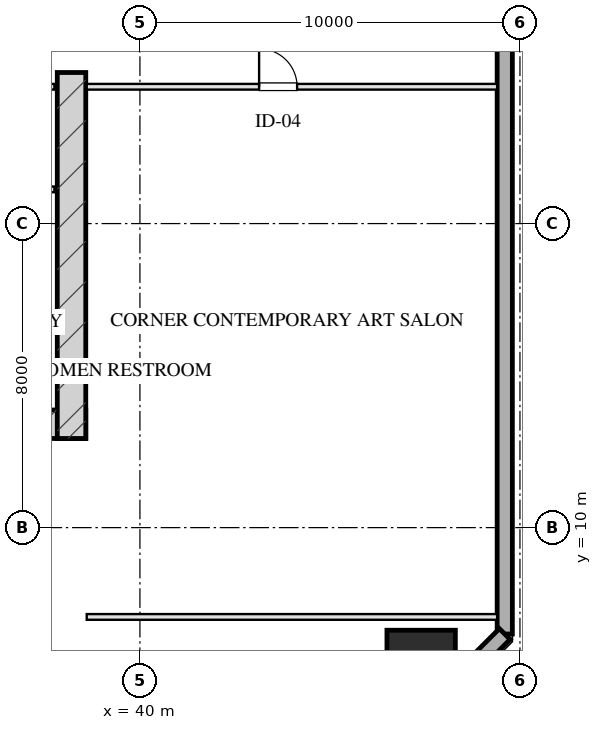
"""IFC4 building model, lengths in metres.
Left out: names, types, materials, properties, quantities, classifications, styles, units other than length and angle.
Written with IfcOpenShell. Run it as: python <this file> out.ifc"""

import sys

from ifc_helpers import new_model, si_unit, direction, frame, frame_2d, origin, origin_2d, place, context, subcontext, project, spatial, rectangle, hollow_rectangle, extrude, element, fill, save


model = new_model("IFC4")
c1 = context("Model", 3, precision=1e-05, world=origin(), true_north=direction((0.0, 1.0)))
c2 = subcontext(c1, "Body", "Model", "MODEL_VIEW")
j1 = project(units=[si_unit("LENGTHUNIT", "METRE"), si_unit("PLANEANGLEUNIT", "RADIAN")], contexts=[c1])
p1 = place(None, origin())
s1 = spatial("IfcSite", under=j1, at=p1, CompositionType="ELEMENT")
p2 = place(p1, origin())
s2 = spatial("IfcBuilding", under=s1, at=p2, CompositionType="ELEMENT")
p3 = place(p2, frame((0.0, 0.0, 54.05)))
s3 = spatial("IfcBuildingStorey", under=s2, at=p3, CompositionType="ELEMENT", Elevation=54.05)
p4 = place(p3, frame((21.425, 12.72, 0.0), z_axis=(0.0, 0.0, 1.0), x_axis=(1.0, 0.0, 0.0)))
e1 = element("IfcWall", 1, at=p4, inside=s3, PredefinedType="SHEAR", context=c2, shape_type="SweptSolid", body=[
    extrude(rectangle(XDim=17.15, YDim=0.75, at=frame_2d((8.575, 0.0))), origin(), (0.0, 0.0, 1.0), 3.45),
])
p5 = place(p3, frame((38.2, 21.975, 0.0), z_axis=(0.0, 0.0, 1.0), x_axis=(0.0, -1.0, 0.0)))
e2 = element("IfcWall", 2, at=p5, inside=s3, PredefinedType="SHEAR", context=c2, shape_type="SweptSolid", body=[
    extrude(rectangle(XDim=9.63, YDim=0.75, at=frame_2d((4.815, 0.0))), origin(), (0.0, 0.0, 1.0), 3.45),
])
p6 = place(p3, frame((47.4, 6.4, 0.0), z_axis=(0.0, 0.0, 1.0), x_axis=(1.0, 0.0, 0.0)))
e3 = element("IfcColumn", 3, at=p6, inside=s3, PredefinedType="COLUMN", context=c2, shape_type="SweptSolid", body=[
    extrude(hollow_rectangle(XDim=1.8, YDim=1.8, WallThickness=0.06, at=origin_2d()), origin(), (0.0, 0.0, 1.0), 3.451),
])
p7 = place(p3, frame((49.6, 60.8, 0.0), z_axis=(0.0, 0.0, 1.0), x_axis=(0.0, -1.0, 0.0)))
e4 = element("IfcWall", 4, at=p7, inside=s3, PredefinedType="SOLIDWALL", context=c2, shape_type="SweptSolid", body=[
    extrude(rectangle(XDim=53.6, YDim=0.4, at=frame_2d((26.8, 0.0))), origin(), (0.0, 0.0, 1.0), 2.61),
])
p8 = place(p3, frame((49.6, 7.2, 0.0), z_axis=(0.0, 0.0, 1.0), x_axis=(-0.707106781187, -0.707106781187, 0.0)))
e5 = element("IfcWall", 5, at=p8, inside=s3, PredefinedType="SOLIDWALL", context=c2, shape_type="SweptSolid", body=[
    extrude(rectangle(XDim=4.243, YDim=0.4, at=frame_2d((2.121, 0.0))), origin(), (0.0, 0.0, 1.0), 2.61),
])
p9 = place(p3, frame((33.95, 21.6, 0.0), z_axis=(0.0, 0.0, 1.0), x_axis=(1.0, 0.0, 0.0)))
e6 = element("IfcWall", 6, at=p9, inside=s3, PredefinedType="PARTITIONING", context=c2, shape_type="SweptSolid", body=[
    extrude(rectangle(XDim=3.8, YDim=0.15, at=frame_2d((1.9, 0.0))), origin(), (0.0, 0.0, 1.0), 3.175),
])
p10 = place(p9, frame((0.45, 0.0, 0.0)))
e7 = element("IfcOpeningElement", 7, at=p10, cuts=e6, PredefinedType="OPENING", context=c2, shape_type="SweptSolid", body=[
    extrude(rectangle(XDim=0.95, YDim=2.05, at=frame_2d((0.475, 1.025))), frame((0.0, 0.085, 0.0), z_axis=(0.0, -1.0, 0.0), x_axis=(1.0, 0.0, 0.0)), (0.0, 0.0, 1.0), 0.17),
])
p11 = place(p3, frame((33.95, 18.9, 0.0), z_axis=(0.0, 0.0, 1.0), x_axis=(1.0, 0.0, 0.0)))
e8 = element("IfcWall", 8, at=p11, inside=s3, PredefinedType="PARTITIONING", context=c2, shape_type="SweptSolid", body=[
    extrude(rectangle(XDim=3.8, YDim=0.15, at=frame_2d((1.9, 0.0))), origin(), (0.0, 0.0, 1.0), 3.175),
])
p12 = place(p11, frame((0.35, 0.0, 0.0)))
e9 = element("IfcOpeningElement", 9, at=p12, cuts=e8, PredefinedType="OPENING", context=c2, shape_type="SweptSolid", body=[
    extrude(rectangle(XDim=0.9, YDim=2.05, at=frame_2d((0.45, 1.025))), frame((0.0, 0.085, 0.0), z_axis=(0.0, -1.0, 0.0), x_axis=(1.0, 0.0, 0.0)), (0.0, 0.0, 1.0), 0.17),
])
p13 = place(p11, frame((2.1, 0.0, 0.0)))
e10 = element("IfcOpeningElement", 10, at=p13, cuts=e8, PredefinedType="OPENING", context=c2, shape_type="SweptSolid", body=[
    extrude(rectangle(XDim=0.9, YDim=2.05, at=frame_2d((0.45, 1.025))), frame((0.0, 0.085, 0.0), z_axis=(0.0, -1.0, 0.0), x_axis=(1.0, 0.0, 0.0)), (0.0, 0.0, 1.0), 0.17),
])
p14 = place(p3, frame((38.6, 7.65, 0.0), z_axis=(0.0, 0.0, 1.0), x_axis=(1.0, 0.0, 0.0)))
e11 = element("IfcWall", 11, at=p14, inside=s3, PredefinedType="PARTITIONING", context=c2, shape_type="SweptSolid", body=[
    extrude(rectangle(XDim=10.8, YDim=0.15, at=frame_2d((5.4, 0.0))), origin(), (0.0, 0.0, 1.0), 3.175),
])
p15 = place(p3, frame((38.6, 21.6, 0.0), z_axis=(0.0, 0.0, 1.0), x_axis=(1.0, 0.0, 0.0)))
e12 = element("IfcWall", 12, at=p15, inside=s3, PredefinedType="PARTITIONING", context=c2, shape_type="SweptSolid", body=[
    extrude(rectangle(XDim=10.8, YDim=0.15, at=frame_2d((5.4, 0.0))), origin(), (0.0, 0.0, 1.0), 3.175),
])
p16 = place(p15, frame((4.536, 0.0, 0.0)))
e13 = element("IfcOpeningElement", 13, at=p16, cuts=e12, PredefinedType="OPENING", context=c2, shape_type="SweptSolid", body=[
    extrude(rectangle(XDim=1.0, YDim=2.05, at=frame_2d((0.5, 1.025))), frame((0.0, 0.085, 0.0), z_axis=(0.0, -1.0, 0.0), x_axis=(1.0, 0.0, 0.0)), (0.0, 0.0, 1.0), 0.17),
])
p17 = place(p16, origin())
e14 = element("IfcDoor", 14, at=p17, inside=s3, OperationType="SINGLE_SWING_LEFT", PredefinedType="DOOR", context=c2, shape_type="SweptSolid", body=[
    extrude(rectangle(XDim=1.0, YDim=2.05, at=frame_2d((0.5, 1.025))), frame((0.0, 0.025, 0.0), z_axis=(0.0, -1.0, 0.0), x_axis=(1.0, 0.0, 0.0)), (0.0, 0.0, 1.0), 0.05),
])
fill(e13, e14)
save(model, sys.argv[1])
